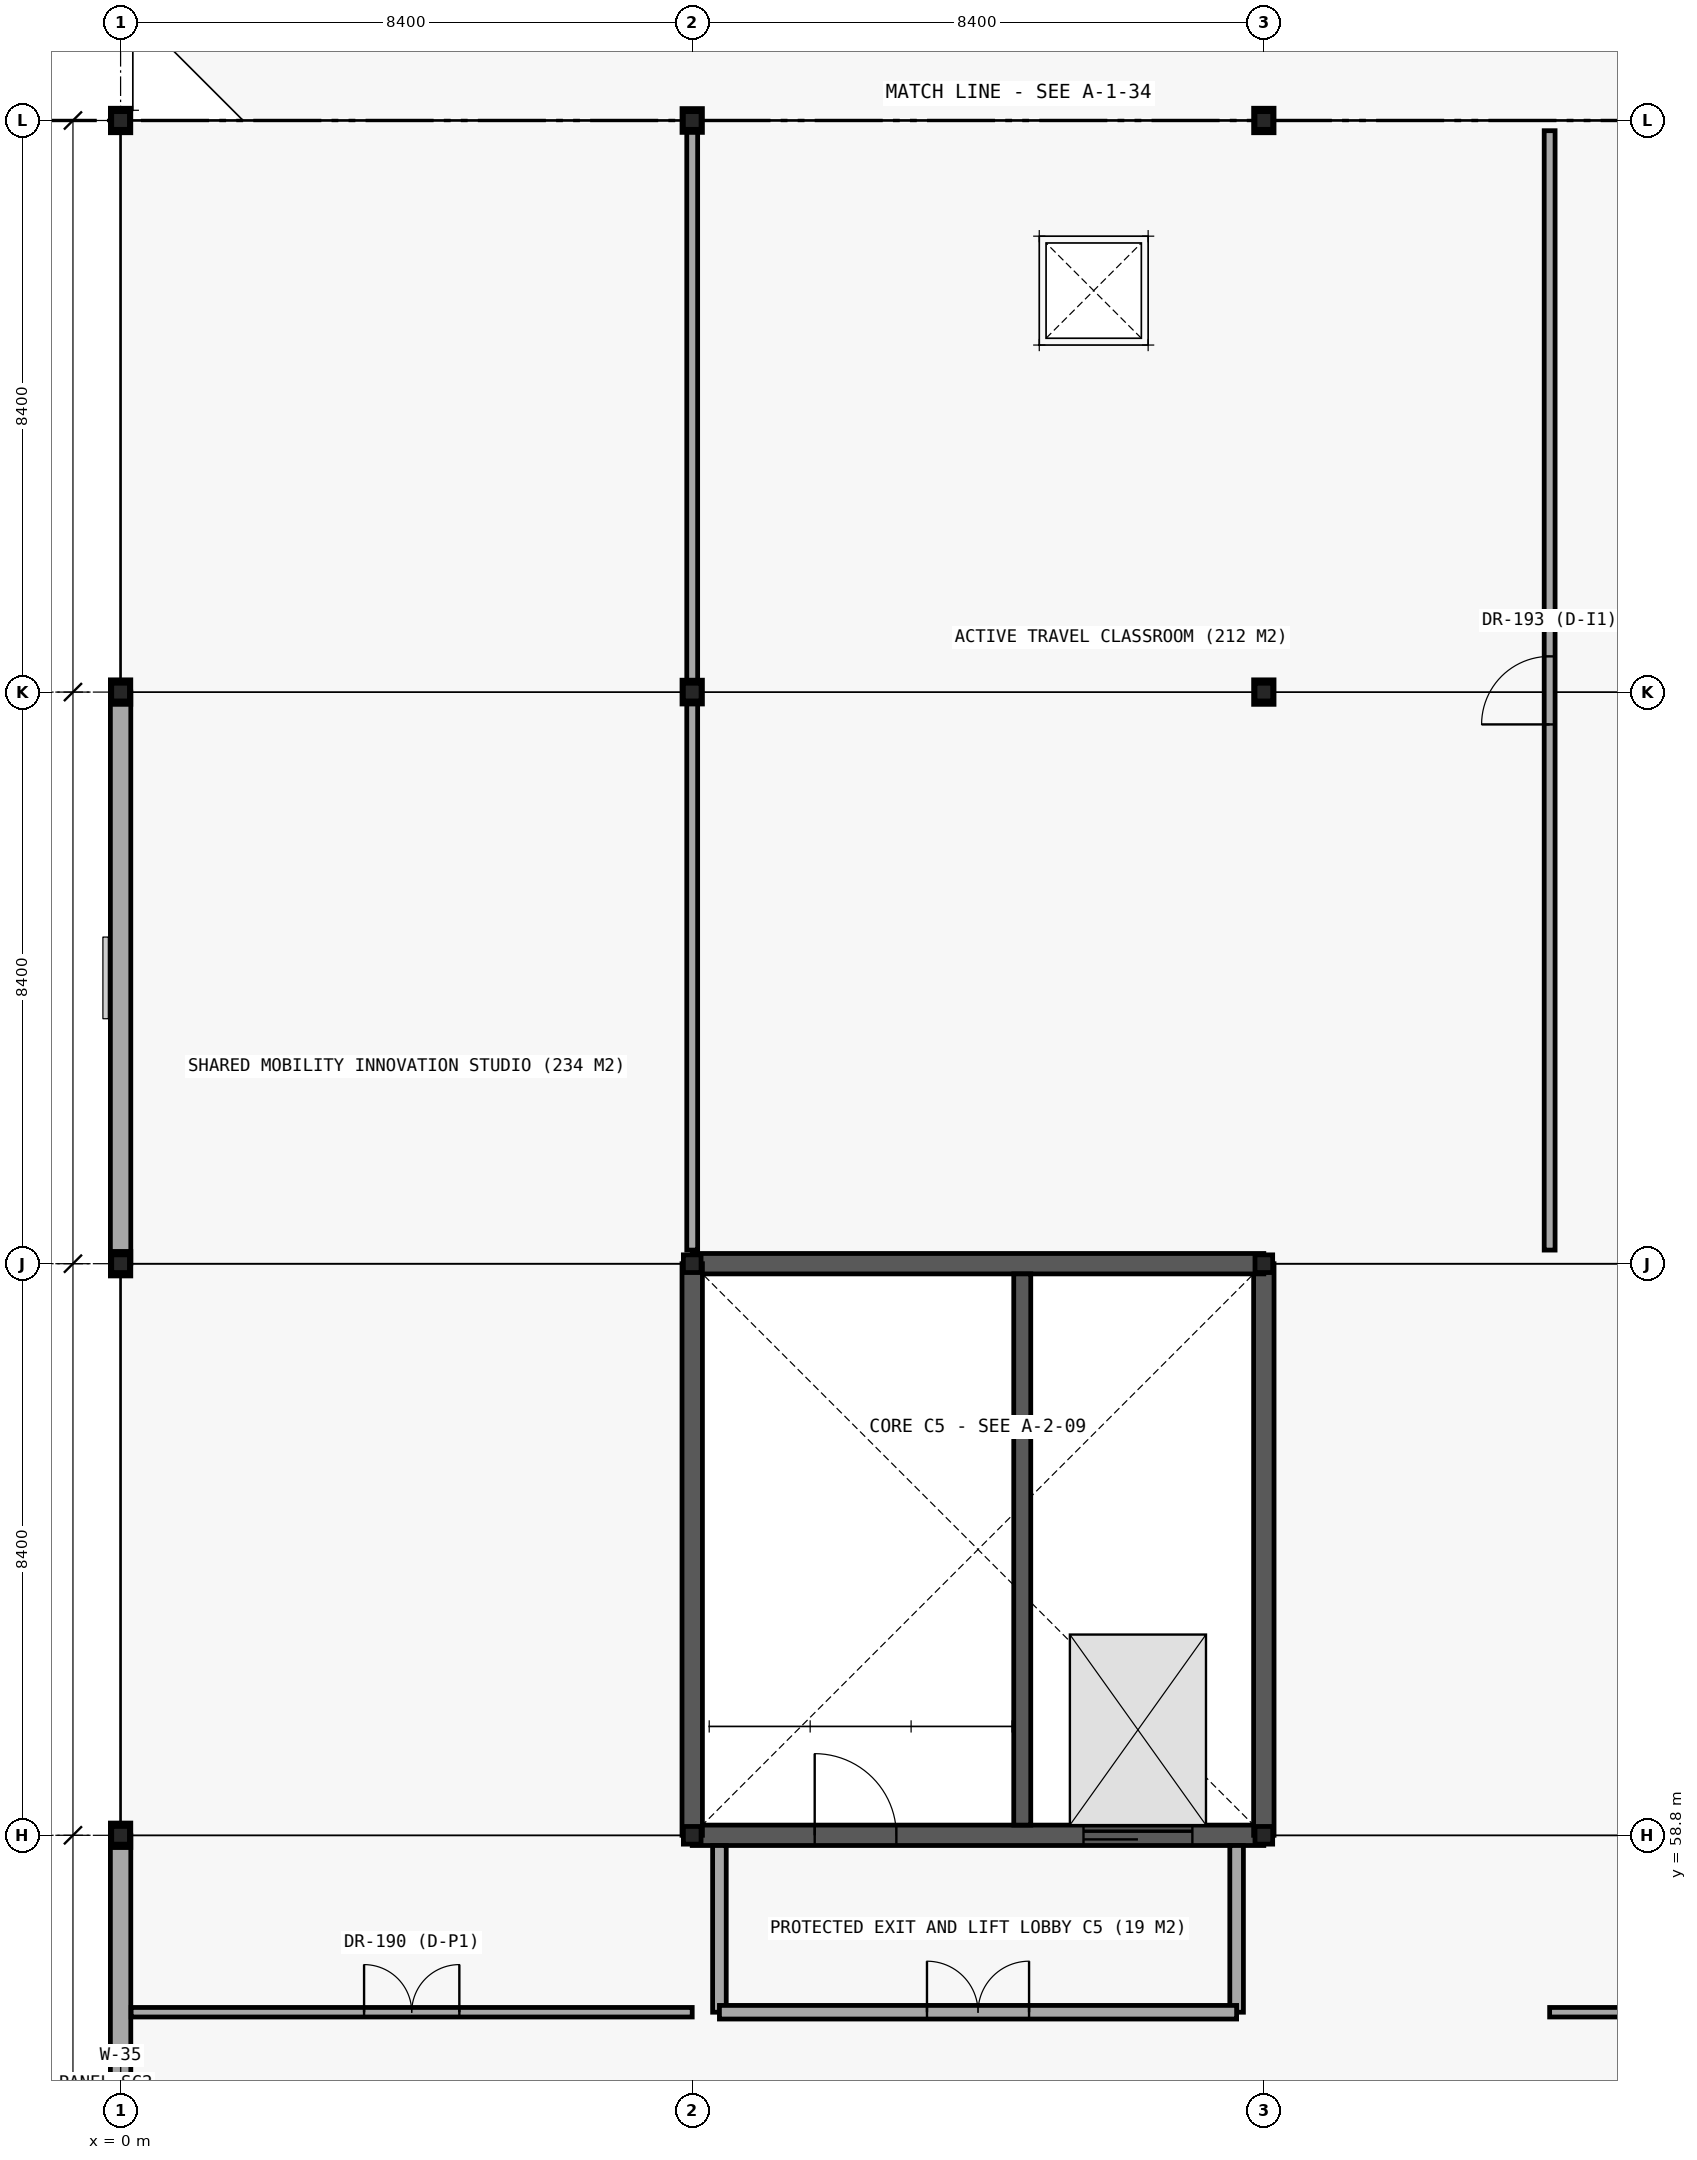
"""IFC4 building model, lengths in metres.
Left out: names, types, materials, properties, quantities, classifications, styles, units other than length and angle.
Written with IfcOpenShell. Run it as: python <this file> out.ifc"""

import sys

from ifc_helpers import new_model, si_unit, direction, frame, frame_2d, origin, origin_2d, place, context, subcontext, project, spatial, rectangle, i_section, extrude, element, fill, save


model = new_model("IFC4")
c1 = context("Model", 3, precision=1e-05, world=origin(), true_north=direction((0.0, 1.0)))
c2 = subcontext(c1, "Body", "Model", "MODEL_VIEW")
j1 = project(units=[si_unit("LENGTHUNIT", "METRE"), si_unit("PLANEANGLEUNIT", "RADIAN")], contexts=[c1])
p1 = place(None, origin())
s1 = spatial("IfcSite", under=j1, at=p1, CompositionType="ELEMENT")
p2 = place(p1, origin())
s2 = spatial("IfcBuilding", under=s1, at=p2, CompositionType="ELEMENT")
p3 = place(p2, frame((0.0, 0.0, 9.0)))
s3 = spatial("IfcBuildingStorey", under=s2, at=p3, CompositionType="ELEMENT", Elevation=9.0)
p4 = place(p3, frame((8.4, 58.8, 0.0), z_axis=(0.0, 0.0, 1.0), x_axis=(1.0, 0.0, 0.0)))
e1 = element("IfcWall", 1, at=p4, inside=s3, PredefinedType="SHEAR", context=c2, shape_type="SweptSolid", body=[
    extrude(rectangle(XDim=8.4, YDim=0.3, at=frame_2d((4.2, 0.0))), origin(), (0.0, 0.0, 1.0), 4.2),
])
p5 = place(p4, frame((1.8, 0.0, 0.0)))
e2 = element("IfcOpeningElement", 2, at=p5, cuts=e1, PredefinedType="OPENING", context=c2, shape_type="SweptSolid", body=[
    extrude(rectangle(XDim=1.2, YDim=2.2, at=frame_2d((0.6, 1.1))), frame((0.0, 0.16, 0.0), z_axis=(0.0, -1.0, 0.0), x_axis=(1.0, 0.0, 0.0)), (0.0, 0.0, 1.0), 0.32),
])
p6 = place(p4, frame((5.75, 0.0, 0.0)))
e3 = element("IfcOpeningElement", 3, at=p6, cuts=e1, PredefinedType="OPENING", context=c2, shape_type="SweptSolid", body=[
    extrude(rectangle(XDim=1.6, YDim=2.4, at=frame_2d((0.8, 1.2))), frame((0.0, 0.16, 0.0), z_axis=(0.0, -1.0, 0.0), x_axis=(1.0, 0.0, 0.0)), (0.0, 0.0, 1.0), 0.32),
])
p7 = place(p3, frame((16.8, 58.8, 0.0), z_axis=(0.0, 0.0, 1.0), x_axis=(0.0, 1.0, 0.0)))
e4 = element("IfcWall", 4, at=p7, inside=s3, PredefinedType="SHEAR", context=c2, shape_type="SweptSolid", body=[
    extrude(rectangle(XDim=8.4, YDim=0.3, at=frame_2d((4.2, 0.0))), origin(), (0.0, 0.0, 1.0), 4.2),
])
p8 = place(p3, frame((16.8, 67.2, 0.0), z_axis=(0.0, 0.0, 1.0), x_axis=(-1.0, 0.0, 0.0)))
e5 = element("IfcWall", 5, at=p8, inside=s3, PredefinedType="SHEAR", context=c2, shape_type="SweptSolid", body=[
    extrude(rectangle(XDim=8.4, YDim=0.3, at=frame_2d((4.2, 0.0))), origin(), (0.0, 0.0, 1.0), 4.2),
])
p9 = place(p3, frame((8.4, 67.2, 0.0), z_axis=(0.0, 0.0, 1.0), x_axis=(0.0, -1.0, 0.0)))
e6 = element("IfcWall", 6, at=p9, inside=s3, PredefinedType="SHEAR", context=c2, shape_type="SweptSolid", body=[
    extrude(rectangle(XDim=8.4, YDim=0.3, at=frame_2d((4.2, 0.0))), origin(), (0.0, 0.0, 1.0), 4.2),
])
p10 = place(p3, frame((13.25, 58.95, 0.0), z_axis=(0.0, 0.0, 1.0), x_axis=(0.0, 1.0, 0.0)))
e7 = element("IfcWall", 7, at=p10, inside=s3, PredefinedType="SHEAR", context=c2, shape_type="SweptSolid", body=[
    extrude(rectangle(XDim=8.1, YDim=0.25, at=frame_2d((4.05, 0.0))), origin(), (0.0, 0.0, 1.0), 4.2),
])
for number, where, z_axis, x_axis in (
    (8, (0.0, 58.8, 0.0), (0.0, 0.0, 1.0), (1.0, 0.0, 0.0)),
    (9, (0.0, 67.2, 0.0), (0.0, 0.0, 1.0), (1.0, 0.0, 0.0)),
    (10, (0.0, 75.6, 0.0), (0.0, 0.0, 1.0), (1.0, 0.0, 0.0)),
    (11, (0.0, 84.0, 0.0), (0.0, 0.0, 1.0), (1.0, 0.0, 0.0)),
):
    element("IfcColumn", number, at=place(p3, frame(where, z_axis=z_axis, x_axis=x_axis)), inside=s3, PredefinedType="COLUMN", context=c2, shape_type="SweptSolid", body=[
        extrude(i_section(OverallWidth=0.3, OverallDepth=0.36, WebThickness=0.012, FlangeThickness=0.022, FilletRadius=0.027, at=origin_2d()), origin(), (0.0, 0.0, 1.0), 4.03),
    ])
for number, where, z_axis, x_axis in (
    (12, (8.4, 75.6, 0.0), (0.0, 0.0, 1.0), (1.0, 0.0, 0.0)),
    (13, (8.4, 84.0, 0.0), (0.0, 0.0, 1.0), (1.0, 0.0, 0.0)),
):
    element("IfcColumn", number, at=place(p3, frame(where, z_axis=z_axis, x_axis=x_axis)), inside=s3, PredefinedType="COLUMN", context=c2, shape_type="SweptSolid", body=[
        extrude(i_section(OverallWidth=0.3, OverallDepth=0.35, WebThickness=0.01, FlangeThickness=0.018, FilletRadius=0.027, at=origin_2d()), origin(), (0.0, 0.0, 1.0), 4.03),
    ])
for number, where, z_axis, x_axis in (
    (14, (16.8, 75.6, 0.0), (0.0, 0.0, 1.0), (1.0, 0.0, 0.0)),
    (15, (16.8, 84.0, 0.0), (0.0, 0.0, 1.0), (1.0, 0.0, 0.0)),
):
    element("IfcColumn", number, at=place(p3, frame(where, z_axis=z_axis, x_axis=x_axis)), inside=s3, PredefinedType="COLUMN", context=c2, shape_type="SweptSolid", body=[
        extrude(i_section(OverallWidth=0.3, OverallDepth=0.36, WebThickness=0.012, FlangeThickness=0.022, FilletRadius=0.027, at=origin_2d()), origin(), (0.0, 0.0, 1.0), 4.03),
    ])
p11 = place(p3, frame((0.0, 58.8, 4.03), z_axis=(0.0, 0.0, 1.0), x_axis=(1.0, 0.0, 0.0)))
e16 = element("IfcColumn", 16, at=p11, inside=s3, PredefinedType="COLUMN", context=c2, shape_type="SweptSolid", body=[
    extrude(i_section(OverallWidth=0.26, OverallDepth=0.26, WebThickness=0.01, FlangeThickness=0.018, FilletRadius=0.024, at=origin_2d()), origin(), (0.0, 0.0, 1.0), 6.71),
])
p12 = place(p3, frame((8.4, 58.8, 4.03), z_axis=(0.0, 0.0, 1.0), x_axis=(1.0, 0.0, 0.0)))
e17 = element("IfcColumn", 17, at=p12, inside=s3, PredefinedType="COLUMN", context=c2, shape_type="SweptSolid", body=[
    extrude(i_section(OverallWidth=0.26, OverallDepth=0.26, WebThickness=0.01, FlangeThickness=0.018, FilletRadius=0.024, at=origin_2d()), origin(), (0.0, 0.0, 1.0), 4.91),
])
p13 = place(p3, frame((16.8, 58.8, 4.03), z_axis=(0.0, 0.0, 1.0), x_axis=(1.0, 0.0, 0.0)))
e18 = element("IfcColumn", 18, at=p13, inside=s3, PredefinedType="COLUMN", context=c2, shape_type="SweptSolid", body=[
    extrude(i_section(OverallWidth=0.26, OverallDepth=0.26, WebThickness=0.01, FlangeThickness=0.018, FilletRadius=0.024, at=origin_2d()), origin(), (0.0, 0.0, 1.0), 3.11),
])
p14 = place(p3, frame((0.0, 67.2, 4.03), z_axis=(0.0, 0.0, 1.0), x_axis=(1.0, 0.0, 0.0)))
e19 = element("IfcColumn", 19, at=p14, inside=s3, PredefinedType="COLUMN", context=c2, shape_type="SweptSolid", body=[
    extrude(i_section(OverallWidth=0.26, OverallDepth=0.26, WebThickness=0.01, FlangeThickness=0.018, FilletRadius=0.024, at=origin_2d()), origin(), (0.0, 0.0, 1.0), 6.71),
])
p15 = place(p3, frame((8.4, 67.2, 4.03), z_axis=(0.0, 0.0, 1.0), x_axis=(1.0, 0.0, 0.0)))
e20 = element("IfcColumn", 20, at=p15, inside=s3, PredefinedType="COLUMN", context=c2, shape_type="SweptSolid", body=[
    extrude(i_section(OverallWidth=0.26, OverallDepth=0.26, WebThickness=0.01, FlangeThickness=0.018, FilletRadius=0.024, at=origin_2d()), origin(), (0.0, 0.0, 1.0), 4.91),
])
p16 = place(p3, frame((16.8, 67.2, 4.03), z_axis=(0.0, 0.0, 1.0), x_axis=(1.0, 0.0, 0.0)))
e21 = element("IfcColumn", 21, at=p16, inside=s3, PredefinedType="COLUMN", context=c2, shape_type="SweptSolid", body=[
    extrude(i_section(OverallWidth=0.26, OverallDepth=0.26, WebThickness=0.01, FlangeThickness=0.018, FilletRadius=0.024, at=origin_2d()), origin(), (0.0, 0.0, 1.0), 3.11),
])
p17 = place(p3, frame((0.0, 75.6, 4.03), z_axis=(0.0, 0.0, 1.0), x_axis=(1.0, 0.0, 0.0)))
e22 = element("IfcColumn", 22, at=p17, inside=s3, PredefinedType="COLUMN", context=c2, shape_type="SweptSolid", body=[
    extrude(i_section(OverallWidth=0.26, OverallDepth=0.26, WebThickness=0.01, FlangeThickness=0.018, FilletRadius=0.024, at=origin_2d()), origin(), (0.0, 0.0, 1.0), 6.71),
])
p18 = place(p3, frame((8.4, 75.6, 4.03), z_axis=(0.0, 0.0, 1.0), x_axis=(1.0, 0.0, 0.0)))
e23 = element("IfcColumn", 23, at=p18, inside=s3, PredefinedType="COLUMN", context=c2, shape_type="SweptSolid", body=[
    extrude(i_section(OverallWidth=0.26, OverallDepth=0.26, WebThickness=0.01, FlangeThickness=0.018, FilletRadius=0.024, at=origin_2d()), origin(), (0.0, 0.0, 1.0), 4.91),
])
p19 = place(p3, frame((16.8, 75.6, 4.03), z_axis=(0.0, 0.0, 1.0), x_axis=(1.0, 0.0, 0.0)))
e24 = element("IfcColumn", 24, at=p19, inside=s3, PredefinedType="COLUMN", context=c2, shape_type="SweptSolid", body=[
    extrude(i_section(OverallWidth=0.26, OverallDepth=0.26, WebThickness=0.01, FlangeThickness=0.018, FilletRadius=0.024, at=origin_2d()), origin(), (0.0, 0.0, 1.0), 3.11),
])
p20 = place(p3, frame((0.0, 84.0, 4.03), z_axis=(0.0, 0.0, 1.0), x_axis=(1.0, 0.0, 0.0)))
e25 = element("IfcColumn", 25, at=p20, inside=s3, PredefinedType="COLUMN", context=c2, shape_type="SweptSolid", body=[
    extrude(i_section(OverallWidth=0.26, OverallDepth=0.26, WebThickness=0.01, FlangeThickness=0.018, FilletRadius=0.024, at=origin_2d()), origin(), (0.0, 0.0, 1.0), 6.71),
])
p21 = place(p3, frame((8.4, 84.0, 4.03), z_axis=(0.0, 0.0, 1.0), x_axis=(1.0, 0.0, 0.0)))
e26 = element("IfcColumn", 26, at=p21, inside=s3, PredefinedType="COLUMN", context=c2, shape_type="SweptSolid", body=[
    extrude(i_section(OverallWidth=0.26, OverallDepth=0.26, WebThickness=0.01, FlangeThickness=0.018, FilletRadius=0.024, at=origin_2d()), origin(), (0.0, 0.0, 1.0), 4.91),
])
p22 = place(p3, frame((16.8, 84.0, 4.03), z_axis=(0.0, 0.0, 1.0), x_axis=(1.0, 0.0, 0.0)))
e27 = element("IfcColumn", 27, at=p22, inside=s3, PredefinedType="COLUMN", context=c2, shape_type="SweptSolid", body=[
    extrude(i_section(OverallWidth=0.26, OverallDepth=0.26, WebThickness=0.01, FlangeThickness=0.018, FilletRadius=0.024, at=origin_2d()), origin(), (0.0, 0.0, 1.0), 3.11),
])
p23 = place(p3, frame((0.0, 58.8, 0.0), z_axis=(0.0, 0.0, 1.0), x_axis=(0.0, -1.0, 0.0)))
e28 = element("IfcWall", 28, at=p23, inside=s3, PredefinedType="STANDARD", context=c2, shape_type="SweptSolid", body=[
    extrude(rectangle(XDim=8.4, YDim=0.3, at=frame_2d((4.2, 0.0))), origin(), (0.0, 0.0, 1.0), 3.46),
])
p24 = place(p23, frame((3.255, 0.0, 0.9)))
e29 = element("IfcOpeningElement", 29, at=p24, cuts=e28, PredefinedType="OPENING", context=c2, shape_type="SweptSolid", body=[
    extrude(rectangle(XDim=1.05, YDim=2.05, at=frame_2d((0.525, 1.025))), frame((0.0, 0.16, 0.0), z_axis=(0.0, -1.0, 0.0), x_axis=(1.0, 0.0, 0.0)), (0.0, 0.0, 1.0), 0.32),
])
p25 = place(p23, frame((5.985, 0.0, 0.9)))
e30 = element("IfcOpeningElement", 30, at=p25, cuts=e28, PredefinedType="OPENING", context=c2, shape_type="SweptSolid", body=[
    extrude(rectangle(XDim=0.9, YDim=2.1, at=frame_2d((0.45, 1.05))), frame((0.0, 0.16, 0.0), z_axis=(0.0, -1.0, 0.0), x_axis=(1.0, 0.0, 0.0)), (0.0, 0.0, 1.0), 0.32),
])
p26 = place(p3, frame((0.0, 75.6, 0.0), z_axis=(0.0, 0.0, 1.0), x_axis=(0.0, -1.0, 0.0)))
e31 = element("IfcWall", 31, at=p26, inside=s3, PredefinedType="STANDARD", context=c2, shape_type="SweptSolid", body=[
    extrude(rectangle(XDim=8.4, YDim=0.3, at=frame_2d((4.2, 0.0))), origin(), (0.0, 0.0, 1.0), 3.46),
])
for number, where, z_axis, x_axis in (
    (32, (8.8, 56.2, 0.0), (0.0, 0.0, 1.0), (0.0, 1.0, 0.0)),
    (33, (16.4, 56.2, 0.0), (0.0, 0.0, 1.0), (0.0, 1.0, 0.0)),
):
    element("IfcWall", number, at=place(p3, frame(where, z_axis=z_axis, x_axis=x_axis)), inside=s3, PredefinedType="PARTITIONING", context=c2, shape_type="SweptSolid", body=[
        extrude(rectangle(XDim=2.45, YDim=0.2, at=frame_2d((1.225, 0.0))), origin(), (0.0, 0.0, 1.0), 3.52),
    ])
p27 = place(p3, frame((8.8, 56.2, 0.0), z_axis=(0.0, 0.0, 1.0), x_axis=(1.0, 0.0, 0.0)))
e34 = element("IfcWall", 34, at=p27, inside=s3, PredefinedType="PARTITIONING", context=c2, shape_type="SweptSolid", body=[
    extrude(rectangle(XDim=7.6, YDim=0.2, at=frame_2d((3.8, 0.0))), origin(), (0.0, 0.0, 1.0), 3.52),
])
p28 = place(p27, frame((3.05, 0.0, 0.0)))
e35 = element("IfcOpeningElement", 35, at=p28, cuts=e34, PredefinedType="OPENING", context=c2, shape_type="SweptSolid", body=[
    extrude(rectangle(XDim=1.5, YDim=2.2, at=frame_2d((0.75, 1.1))), frame((0.0, 0.11, 0.0), z_axis=(0.0, -1.0, 0.0), x_axis=(1.0, 0.0, 0.0)), (0.0, 0.0, 1.0), 0.22),
])
p29 = place(p3, frame((0.155, 56.2, 0.0), z_axis=(0.0, 0.0, 1.0), x_axis=(1.0, 0.0, 0.0)))
e36 = element("IfcWall", 36, at=p29, inside=s3, PredefinedType="PARTITIONING", context=c2, shape_type="SweptSolid", body=[
    extrude(rectangle(XDim=8.245, YDim=0.14, at=frame_2d((4.123, 0.0))), origin(), (0.0, 0.0, 1.0), 3.5),
])
p30 = place(p29, frame((3.423, 0.0, 0.0)))
e37 = element("IfcOpeningElement", 37, at=p30, cuts=e36, PredefinedType="OPENING", context=c2, shape_type="SweptSolid", body=[
    extrude(rectangle(XDim=1.4, YDim=2.25, at=frame_2d((0.7, 1.125))), frame((0.0, 0.08, 0.0), z_axis=(0.0, -1.0, 0.0), x_axis=(1.0, 0.0, 0.0)), (0.0, 0.0, 1.0), 0.16),
])
p31 = place(p3, frame((21.0, 56.2, 0.0), z_axis=(0.0, 0.0, 1.0), x_axis=(1.0, 0.0, 0.0)))
e38 = element("IfcWall", 38, at=p31, inside=s3, PredefinedType="PARTITIONING", context=c2, shape_type="SweptSolid", body=[
    extrude(rectangle(XDim=12.555, YDim=0.14, at=frame_2d((6.277, 0.0))), origin(), (0.0, 0.0, 1.0), 3.5),
])
p32 = place(p31, frame((5.577, 0.0, 0.0)))
e39 = element("IfcOpeningElement", 39, at=p32, cuts=e38, PredefinedType="OPENING", context=c2, shape_type="SweptSolid", body=[
    extrude(rectangle(XDim=1.4, YDim=2.25, at=frame_2d((0.7, 1.125))), frame((0.0, 0.08, 0.0), z_axis=(0.0, -1.0, 0.0), x_axis=(1.0, 0.0, 0.0)), (0.0, 0.0, 1.0), 0.16),
])
p33 = place(p3, frame((8.4, 67.4, 0.0), z_axis=(0.0, 0.0, 1.0), x_axis=(0.0, 1.0, 0.0)))
e40 = element("IfcWall", 40, at=p33, inside=s3, PredefinedType="PARTITIONING", context=c2, shape_type="SweptSolid", body=[
    extrude(rectangle(XDim=16.45, YDim=0.16, at=frame_2d((8.225, 0.0))), origin(), (0.0, 0.0, 1.0), 3.5),
])
p34 = place(p3, frame((21.0, 67.4, 0.0), z_axis=(0.0, 0.0, 1.0), x_axis=(0.0, 1.0, 0.0)))
e41 = element("IfcWall", 41, at=p34, inside=s3, PredefinedType="PARTITIONING", context=c2, shape_type="SweptSolid", body=[
    extrude(rectangle(XDim=16.45, YDim=0.16, at=frame_2d((8.225, 0.0))), origin(), (0.0, 0.0, 1.0), 3.5),
])
p35 = place(p34, frame((7.725, 0.0, 0.0)))
e42 = element("IfcOpeningElement", 42, at=p35, cuts=e41, PredefinedType="OPENING", context=c2, shape_type="SweptSolid", body=[
    extrude(rectangle(XDim=1.0, YDim=2.15, at=frame_2d((0.5, 1.075))), frame((0.0, 0.09, 0.0), z_axis=(0.0, -1.0, 0.0), x_axis=(1.0, 0.0, 0.0)), (0.0, 0.0, 1.0), 0.18),
])
p36 = place(p24, origin())
e43 = element("IfcWindow", 43, at=p36, inside=s3, PartitioningType="SINGLE_PANEL", PredefinedType="WINDOW", context=c2, shape_type="SweptSolid", body=[
    extrude(rectangle(XDim=1.05, YDim=2.05, at=frame_2d((0.525, 1.025))), frame((0.0, 0.03, 0.0), z_axis=(0.0, -1.0, 0.0), x_axis=(1.0, 0.0, 0.0)), (0.0, 0.0, 1.0), 0.06),
])
fill(e29, e43)
p37 = place(p5, origin())
e44 = element("IfcDoor", 44, at=p37, inside=s3, OperationType="SINGLE_SWING_LEFT", PredefinedType="DOOR", context=c2, shape_type="SweptSolid", body=[
    extrude(rectangle(XDim=1.2, YDim=2.2, at=frame_2d((0.6, 1.1))), frame((0.0, 0.025, 0.0), z_axis=(0.0, -1.0, 0.0), x_axis=(1.0, 0.0, 0.0)), (0.0, 0.0, 1.0), 0.05),
])
fill(e2, e44)
p38 = place(p6, origin())
e45 = element("IfcDoor", 45, at=p38, inside=s3, OperationType="SLIDING_TO_LEFT", PredefinedType="DOOR", context=c2, shape_type="SweptSolid", body=[
    extrude(rectangle(XDim=1.6, YDim=2.4, at=frame_2d((0.8, 1.2))), frame((0.0, 0.025, 0.0), z_axis=(0.0, -1.0, 0.0), x_axis=(1.0, 0.0, 0.0)), (0.0, 0.0, 1.0), 0.05),
])
fill(e3, e45)
p39 = place(p28, origin())
e46 = element("IfcDoor", 46, at=p39, inside=s3, OperationType="DOUBLE_DOOR_SINGLE_SWING", PredefinedType="DOOR", context=c2, shape_type="SweptSolid", body=[
    extrude(rectangle(XDim=1.5, YDim=2.2, at=frame_2d((0.75, 1.1))), frame((0.0, 0.025, 0.0), z_axis=(0.0, -1.0, 0.0), x_axis=(1.0, 0.0, 0.0)), (0.0, 0.0, 1.0), 0.05),
])
fill(e35, e46)
p40 = place(p30, origin())
e47 = element("IfcDoor", 47, at=p40, inside=s3, OperationType="DOUBLE_DOOR_SINGLE_SWING", PredefinedType="DOOR", context=c2, shape_type="SweptSolid", body=[
    extrude(rectangle(XDim=1.4, YDim=2.25, at=frame_2d((0.7, 1.125))), frame((0.0, 0.025, 0.0), z_axis=(0.0, -1.0, 0.0), x_axis=(1.0, 0.0, 0.0)), (0.0, 0.0, 1.0), 0.05),
])
fill(e37, e47)
p41 = place(p35, origin())
e48 = element("IfcDoor", 48, at=p41, inside=s3, OperationType="SINGLE_SWING_LEFT", PredefinedType="DOOR", context=c2, shape_type="SweptSolid", body=[
    extrude(rectangle(XDim=1.0, YDim=2.15, at=frame_2d((0.5, 1.075))), frame((0.0, 0.025, 0.0), z_axis=(0.0, -1.0, 0.0), x_axis=(1.0, 0.0, 0.0)), (0.0, 0.0, 1.0), 0.05),
])
fill(e42, e48)
save(model, sys.argv[1])
